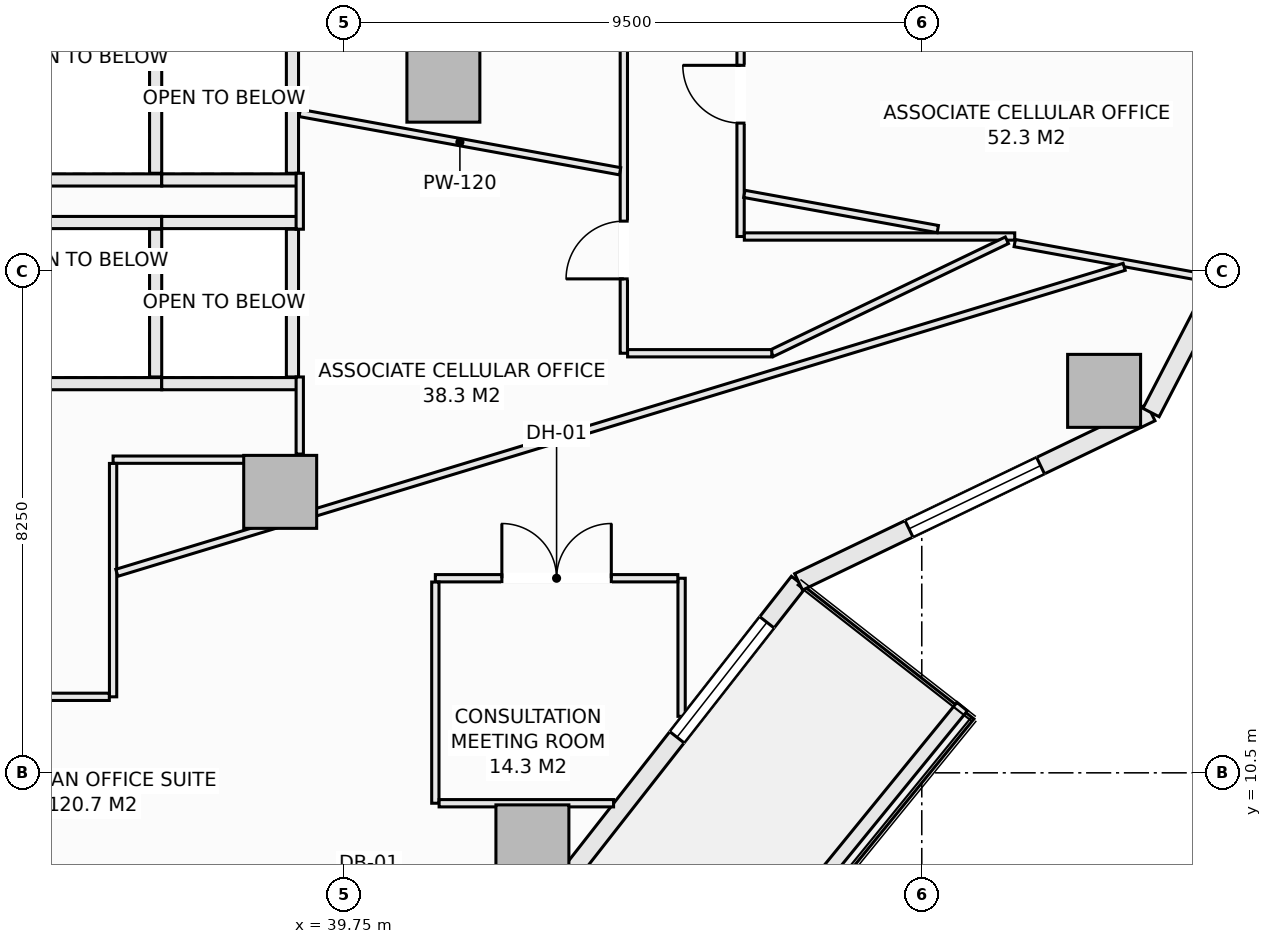
"""IFC4 building model, lengths in metres.
Left out: names, types, materials, properties, quantities, classifications, styles, units other than length and angle.
Written with IfcOpenShell. Run it as: python <this file> out.ifc"""

import sys

from ifc_helpers import new_model, si_unit, direction, frame, frame_2d, origin, origin_2d, place, context, subcontext, project, spatial, rectangle, extrude, element, fill, save


model = new_model("IFC4")
c1 = context("Model", 3, precision=1e-05, world=origin(), true_north=direction((0.0, 1.0)))
c2 = subcontext(c1, "Body", "Model", "MODEL_VIEW")
j1 = project(units=[si_unit("LENGTHUNIT", "METRE"), si_unit("PLANEANGLEUNIT", "RADIAN")], contexts=[c1])
p1 = place(None, origin())
s1 = spatial("IfcSite", under=j1, at=p1, CompositionType="ELEMENT")
p2 = place(p1, origin())
s2 = spatial("IfcBuilding", under=s1, at=p2, CompositionType="ELEMENT")
p3 = place(p2, frame((0.0, 0.0, 72.7)))
s3 = spatial("IfcBuildingStorey", under=s2, at=p3, CompositionType="ELEMENT", Elevation=72.7)
for number, where, z_axis, x_axis in (
    (1, (42.846, 9.373, -0.28), (0.0, 0.0, 1.0), (1.0, 0.0, 0.0)),
    (2, (52.249, 16.781, -0.28), (0.0, 0.0, 1.0), (1.0, 0.0, 0.0)),
    (3, (38.698, 15.121, -0.28), (0.0, 0.0, 1.0), (1.0, 0.0, 0.0)),
    (4, (41.382, 21.801, -0.28), (0.0, 0.0, 1.0), (1.0, 0.0, 0.0)),
):
    element("IfcColumn", number, at=place(p3, frame(where, z_axis=z_axis, x_axis=x_axis)), inside=s3, PredefinedType="COLUMN", context=c2, shape_type="SweptSolid", body=[
        extrude(rectangle(XDim=1.2, YDim=1.2, at=origin_2d()), origin(), (0.0, 0.0, 1.0), 3.85),
    ])
p4 = place(p3, frame((43.344, 8.684, 0.0), z_axis=(0.0, 0.0, 1.0), x_axis=(0.616434798832, 0.78740595552, 0.0)))
e5 = element("IfcWall", 5, at=p4, inside=s3, PredefinedType="SOLIDWALL", context=c2, shape_type="SweptSolid", body=[
    extrude(rectangle(XDim=6.294, YDim=0.3, at=frame_2d((3.147, 0.0))), origin(), (0.0, 0.0, 1.0), 3.093),
])
p5 = place(p4, frame((3.05, 0.0, 0.85)))
e6 = element("IfcOpeningElement", 6, at=p5, cuts=e5, PredefinedType="OPENING", context=c2, shape_type="SweptSolid", body=[
    extrude(rectangle(XDim=2.4, YDim=1.9, at=frame_2d((1.2, 0.95))), frame((0.0, 0.16, 0.0), z_axis=(0.0, -1.0, 0.0), x_axis=(1.0, 0.0, 0.0)), (0.0, 0.0, 1.0), 0.32),
])
p6 = place(p3, frame((47.224, 13.64, 0.0), z_axis=(0.0, 0.0, 1.0), x_axis=(0.901354747727, 0.433081538224, 0.0)))
e7 = element("IfcWall", 7, at=p6, inside=s3, PredefinedType="SOLIDWALL", context=c2, shape_type="SweptSolid", body=[
    extrude(rectangle(XDim=6.431, YDim=0.3, at=frame_2d((3.215, 0.0))), origin(), (0.0, 0.0, 1.0), 3.093),
])
p7 = place(p6, frame((2.015, 0.0, 0.85)))
e8 = element("IfcOpeningElement", 8, at=p7, cuts=e7, PredefinedType="OPENING", context=c2, shape_type="SweptSolid", body=[
    extrude(rectangle(XDim=2.4, YDim=1.9, at=frame_2d((1.2, 0.95))), frame((0.0, 0.16, 0.0), z_axis=(0.0, -1.0, 0.0), x_axis=(1.0, 0.0, 0.0)), (0.0, 0.0, 1.0), 0.32),
])
p8 = place(p3, frame((53.021, 16.425, 0.0), z_axis=(0.0, 0.0, 1.0), x_axis=(0.459800981414, 0.888021991558, 0.0)))
e9 = element("IfcWall", 9, at=p8, inside=s3, PredefinedType="SOLIDWALL", context=c2, shape_type="SweptSolid", body=[
    extrude(rectangle(XDim=5.744, YDim=0.3, at=frame_2d((2.872, 0.0))), origin(), (0.0, 0.0, 1.0), 3.093),
])
p9 = place(p8, frame((2.85, 0.0, 0.85)))
e10 = element("IfcOpeningElement", 10, at=p9, cuts=e9, PredefinedType="OPENING", context=c2, shape_type="SweptSolid", body=[
    extrude(rectangle(XDim=2.4, YDim=1.9, at=frame_2d((1.2, 0.95))), frame((0.0, 0.16, 0.0), z_axis=(0.0, -1.0, 0.0), x_axis=(1.0, 0.0, 0.0)), (0.0, 0.0, 1.0), 0.32),
])
p10 = place(p3, frame((45.292, 5.918, 0.0), z_axis=(0.0, 0.0, 1.0), x_axis=(0.631819273026, 0.775115737315, 0.0)))
e11 = element("IfcWall", 11, at=p10, inside=s3, PredefinedType="PARAPET", context=c2, shape_type="SweptSolid", body=[
    extrude(rectangle(XDim=7.316, YDim=0.22, at=frame_2d((3.658, 0.0))), origin(), (0.0, 0.0, 1.0), 0.52),
])
for number, where, z_axis, x_axis in (
    (12, (34.5, 19.55, 0.0), (0.0, 0.0, 1.0), (1.0, 0.0, 0.0)),
    (13, (34.5, 16.9, 0.0), (0.0, 0.0, 1.0), (1.0, 0.0, 0.0)),
):
    element("IfcWall", number, at=place(p3, frame(where, z_axis=z_axis, x_axis=x_axis)), inside=s3, PredefinedType="SOLIDWALL", context=c2, shape_type="SweptSolid", body=[
        extrude(rectangle(XDim=2.25, YDim=0.2, at=frame_2d((1.125, 0.0))), origin(), (0.0, 0.0, 1.0), 3.57),
    ])
p11 = place(p3, frame((36.65, 17.01, 0.0), z_axis=(0.0, 0.0, 1.0), x_axis=(0.0, 1.0, 0.0)))
e14 = element("IfcWall", 14, at=p11, inside=s3, PredefinedType="SOLIDWALL", context=c2, shape_type="SweptSolid", body=[
    extrude(rectangle(XDim=2.43, YDim=0.2, at=frame_2d((1.215, 0.0))), origin(), (0.0, 0.0, 1.0), 3.57),
])
for number, where, z_axis, x_axis in (
    (15, (36.75, 19.55, 0.0), (0.0, 0.0, 1.0), (1.0, 0.0, 0.0)),
    (16, (36.75, 16.9, 0.0), (0.0, 0.0, 1.0), (1.0, 0.0, 0.0)),
):
    element("IfcWall", number, at=place(p3, frame(where, z_axis=z_axis, x_axis=x_axis)), inside=s3, PredefinedType="SOLIDWALL", context=c2, shape_type="SweptSolid", body=[
        extrude(rectangle(XDim=2.25, YDim=0.2, at=frame_2d((1.125, 0.0))), origin(), (0.0, 0.0, 1.0), 3.57),
    ])
p12 = place(p3, frame((38.9, 17.01, 0.0), z_axis=(0.0, 0.0, 1.0), x_axis=(0.0, 1.0, 0.0)))
e17 = element("IfcWall", 17, at=p12, inside=s3, PredefinedType="SOLIDWALL", context=c2, shape_type="SweptSolid", body=[
    extrude(rectangle(XDim=2.43, YDim=0.2, at=frame_2d((1.215, 0.0))), origin(), (0.0, 0.0, 1.0), 3.57),
])
p13 = place(p3, frame((34.5, 20.25, 0.0), z_axis=(0.0, 0.0, 1.0), x_axis=(1.0, 0.0, 0.0)))
e18 = element("IfcWall", 18, at=p13, inside=s3, PredefinedType="SOLIDWALL", context=c2, shape_type="SweptSolid", body=[
    extrude(rectangle(XDim=2.25, YDim=0.2, at=frame_2d((1.125, 0.0))), origin(), (0.0, 0.0, 1.0), 3.57),
])
p14 = place(p3, frame((36.65, 20.36, 0.0), z_axis=(0.0, 0.0, 1.0), x_axis=(0.0, 1.0, 0.0)))
e19 = element("IfcWall", 19, at=p14, inside=s3, PredefinedType="SOLIDWALL", context=c2, shape_type="SweptSolid", body=[
    extrude(rectangle(XDim=2.43, YDim=0.2, at=frame_2d((1.215, 0.0))), origin(), (0.0, 0.0, 1.0), 3.57),
])
p15 = place(p3, frame((36.75, 20.25, 0.0), z_axis=(0.0, 0.0, 1.0), x_axis=(1.0, 0.0, 0.0)))
e20 = element("IfcWall", 20, at=p15, inside=s3, PredefinedType="SOLIDWALL", context=c2, shape_type="SweptSolid", body=[
    extrude(rectangle(XDim=2.25, YDim=0.2, at=frame_2d((1.125, 0.0))), origin(), (0.0, 0.0, 1.0), 3.57),
])
p16 = place(p3, frame((38.9, 20.36, 0.0), z_axis=(0.0, 0.0, 1.0), x_axis=(0.0, 1.0, 0.0)))
e21 = element("IfcWall", 21, at=p16, inside=s3, PredefinedType="SOLIDWALL", context=c2, shape_type="SweptSolid", body=[
    extrude(rectangle(XDim=2.43, YDim=0.2, at=frame_2d((1.215, 0.0))), origin(), (0.0, 0.0, 1.0), 3.57),
])
p17 = place(p3, frame((35.95, 15.65, 0.0), z_axis=(0.0, 0.0, 1.0), x_axis=(1.0, 0.0, 0.0)))
e22 = element("IfcWall", 22, at=p17, inside=s3, PredefinedType="PARTITIONING", context=c2, shape_type="SweptSolid", body=[
    extrude(rectangle(XDim=2.291, YDim=0.12, at=frame_2d((1.146, 0.0))), origin(), (0.0, 0.0, 1.0), 3.57),
])
p18 = place(p3, frame((35.95, 11.75, 0.0), z_axis=(0.0, 0.0, 1.0), x_axis=(0.0, 1.0, 0.0)))
e23 = element("IfcWall", 23, at=p18, inside=s3, PredefinedType="PARTITIONING", context=c2, shape_type="SweptSolid", body=[
    extrude(rectangle(XDim=3.838, YDim=0.12, at=frame_2d((1.919, 0.0))), origin(), (0.0, 0.0, 1.0), 3.57),
])
p19 = place(p3, frame((27.242, 11.75, 0.0), z_axis=(0.0, 0.0, 1.0), x_axis=(1.0, 0.0, 0.0)))
e24 = element("IfcWall", 24, at=p19, inside=s3, PredefinedType="PARTITIONING", context=c2, shape_type="SweptSolid", body=[
    extrude(rectangle(XDim=8.646, YDim=0.12, at=frame_2d((4.323, 0.0))), origin(), (0.0, 0.0, 1.0), 3.57),
])
p20 = place(p19, frame((2.514, 0.0, 0.0)))
e25 = element("IfcOpeningElement", 25, at=p20, cuts=e24, PredefinedType="OPENING", context=c2, shape_type="SweptSolid", body=[
    extrude(rectangle(XDim=0.95, YDim=2.1, at=frame_2d((0.475, 1.05))), frame((0.0, 0.07, 0.0), z_axis=(0.0, -1.0, 0.0), x_axis=(1.0, 0.0, 0.0)), (0.0, 0.0, 1.0), 0.14),
])
p21 = place(p19, frame((6.011, 0.0, 0.0)))
e26 = element("IfcOpeningElement", 26, at=p21, cuts=e24, PredefinedType="OPENING", context=c2, shape_type="SweptSolid", body=[
    extrude(rectangle(XDim=0.95, YDim=2.1, at=frame_2d((0.475, 1.05))), frame((0.0, 0.07, 0.0), z_axis=(0.0, -1.0, 0.0), x_axis=(1.0, 0.0, 0.0)), (0.0, 0.0, 1.0), 0.14),
])
p22 = place(p3, frame((44.35, 17.4, 0.0), z_axis=(0.0, 0.0, 1.0), x_axis=(0.0, 1.0, 0.0)))
e27 = element("IfcWall", 27, at=p22, inside=s3, PredefinedType="PARTITIONING", context=c2, shape_type="SweptSolid", body=[
    extrude(rectangle(XDim=5.62, YDim=0.12, at=frame_2d((2.81, 0.0))), origin(), (0.0, 0.0, 1.0), 3.57),
])
p23 = place(p22, frame((1.223, 0.0, 0.0)))
e28 = element("IfcOpeningElement", 28, at=p23, cuts=e27, PredefinedType="OPENING", context=c2, shape_type="SweptSolid", body=[
    extrude(rectangle(XDim=0.95, YDim=2.1, at=frame_2d((0.475, 1.05))), frame((0.0, 0.07, 0.0), z_axis=(0.0, -1.0, 0.0), x_axis=(1.0, 0.0, 0.0)), (0.0, 0.0, 1.0), 0.14),
])
p24 = place(p3, frame((46.27, 19.32, 0.0), z_axis=(0.0, 0.0, 1.0), x_axis=(0.0, 1.0, 0.0)))
e29 = element("IfcWall", 29, at=p24, inside=s3, PredefinedType="PARTITIONING", context=c2, shape_type="SweptSolid", body=[
    extrude(rectangle(XDim=14.798, YDim=0.12, at=frame_2d((7.399, 0.0))), origin(), (0.0, 0.0, 1.0), 3.57),
])
p25 = place(p24, frame((1.865, 0.0, 0.0)))
e30 = element("IfcOpeningElement", 30, at=p25, cuts=e29, PredefinedType="OPENING", context=c2, shape_type="SweptSolid", body=[
    extrude(rectangle(XDim=0.95, YDim=2.1, at=frame_2d((0.475, 1.05))), frame((0.0, 0.07, 0.0), z_axis=(0.0, -1.0, 0.0), x_axis=(1.0, 0.0, 0.0)), (0.0, 0.0, 1.0), 0.14),
])
p26 = place(p24, frame((5.818, 0.0, 0.0)))
e31 = element("IfcOpeningElement", 31, at=p26, cuts=e29, PredefinedType="OPENING", context=c2, shape_type="SweptSolid", body=[
    extrude(rectangle(XDim=0.95, YDim=2.1, at=frame_2d((0.475, 1.05))), frame((0.0, 0.07, 0.0), z_axis=(0.0, -1.0, 0.0), x_axis=(1.0, 0.0, 0.0)), (0.0, 0.0, 1.0), 0.14),
])
p27 = place(p24, frame((10.871, 0.0, 0.0)))
e32 = element("IfcOpeningElement", 32, at=p27, cuts=e29, PredefinedType="OPENING", context=c2, shape_type="SweptSolid", body=[
    extrude(rectangle(XDim=0.95, YDim=2.1, at=frame_2d((0.475, 1.05))), frame((0.0, 0.07, 0.0), z_axis=(0.0, -1.0, 0.0), x_axis=(1.0, 0.0, 0.0)), (0.0, 0.0, 1.0), 0.14),
])
p28 = place(p3, frame((46.332, 19.32, 0.0), z_axis=(0.0, 0.0, 1.0), x_axis=(1.0, 0.0, 0.0)))
e33 = element("IfcWall", 33, at=p28, inside=s3, PredefinedType="PARTITIONING", context=c2, shape_type="SweptSolid", body=[
    extrude(rectangle(XDim=4.447, YDim=0.12, at=frame_2d((2.224, 0.0))), origin(), (0.0, 0.0, 1.0), 3.205),
])
p29 = place(p3, frame((46.783, 17.4, 0.0), z_axis=(0.0, 0.0, 1.0), x_axis=(0.901339159108, 0.433113980679, 0.0)))
e34 = element("IfcWall", 34, at=p29, inside=s3, PredefinedType="PARTITIONING", context=c2, shape_type="SweptSolid", body=[
    extrude(rectangle(XDim=4.29, YDim=0.12, at=frame_2d((2.145, 0.0))), origin(), (0.0, 0.0, 1.0), 3.57),
])
p30 = place(p3, frame((44.412, 17.4, 0.0), z_axis=(0.0, 0.0, 1.0), x_axis=(1.0, 0.0, 0.0)))
e35 = element("IfcWall", 35, at=p30, inside=s3, PredefinedType="PARTITIONING", context=c2, shape_type="SweptSolid", body=[
    extrude(rectangle(XDim=2.371, YDim=0.12, at=frame_2d((1.186, 0.0))), origin(), (0.0, 0.0, 1.0), 3.57),
])
p31 = place(p3, frame((39.02, 15.742, 0.0), z_axis=(0.0, 0.0, 1.0), x_axis=(0.0, 1.0, 0.0)))
e36 = element("IfcWall", 36, at=p31, inside=s3, PredefinedType="PARTITIONING", context=c2, shape_type="SweptSolid", body=[
    extrude(rectangle(XDim=1.268, YDim=0.12, at=frame_2d((0.634, 0.0))), origin(), (0.0, 0.0, 1.0), 2.934),
])
p32 = place(p3, frame((39.02, 19.44, 0.0), z_axis=(0.0, 0.0, 1.0), x_axis=(0.0, 1.0, 0.0)))
e37 = element("IfcWall", 37, at=p32, inside=s3, PredefinedType="PARTITIONING", context=c2, shape_type="SweptSolid", body=[
    extrude(rectangle(XDim=0.92, YDim=0.12, at=frame_2d((0.46, 0.0))), origin(), (0.0, 0.0, 1.0), 3.57),
])
p33 = place(p3, frame((39.02, 21.351, 0.0), z_axis=(0.0, 0.0, 1.0), x_axis=(0.983848017156, -0.179005807552, 0.0)))
e38 = element("IfcWall", 38, at=p33, inside=s3, PredefinedType="PARTITIONING", context=c2, shape_type="SweptSolid", body=[
    extrude(rectangle(XDim=5.354, YDim=0.12, at=frame_2d((2.677, 0.0))), origin(), (0.0, 0.0, 1.0), 3.205),
])
p34 = place(p3, frame((46.332, 20.021, 0.0), z_axis=(0.0, 0.0, 1.0), x_axis=(0.983836071263, -0.17907145189, 0.0)))
e39 = element("IfcWall", 39, at=p34, inside=s3, PredefinedType="PARTITIONING", context=c2, shape_type="SweptSolid", body=[
    extrude(rectangle(XDim=3.234, YDim=0.12, at=frame_2d((1.617, 0.0))), origin(), (0.0, 0.0, 1.0), 3.57),
])
p35 = place(p3, frame((50.779, 19.212, 0.0), z_axis=(0.0, 0.0, 1.0), x_axis=(0.983831584621, -0.179096100189, 0.0)))
e40 = element("IfcWall", 40, at=p35, inside=s3, PredefinedType="PARTITIONING", context=c2, shape_type="SweptSolid", body=[
    extrude(rectangle(XDim=3.263, YDim=0.12, at=frame_2d((1.632, 0.0))), origin(), (0.0, 0.0, 1.0), 3.57),
])
p36 = place(p3, frame((36.012, 13.79, 0.0), z_axis=(0.0, 0.0, 1.0), x_axis=(0.95683920317, 0.290617857809, 0.0)))
e41 = element("IfcWall", 41, at=p36, inside=s3, PredefinedType="PARTITIONING", context=c2, shape_type="SweptSolid", body=[
    extrude(rectangle(XDim=17.314, YDim=0.12, at=frame_2d((8.657, 0.0))), origin(), (0.0, 0.0, 1.0), 3.57),
])
p37 = place(p3, frame((45.3, 11.429, 0.0), z_axis=(0.0, 0.0, 1.0), x_axis=(0.0, 1.0, 0.0)))
e42 = element("IfcWall", 42, at=p37, inside=s3, PredefinedType="PARTITIONING", context=c2, shape_type="SweptSolid", body=[
    extrude(rectangle(XDim=2.271, YDim=0.12, at=frame_2d((1.135, 0.0))), origin(), (0.0, 0.0, 1.0), 3.57),
])
p38 = place(p3, frame((41.25, 13.7, 0.0), z_axis=(0.0, 0.0, 1.0), x_axis=(1.0, 0.0, 0.0)))
e43 = element("IfcWall", 43, at=p38, inside=s3, PredefinedType="PARTITIONING", context=c2, shape_type="SweptSolid", body=[
    extrude(rectangle(XDim=3.988, YDim=0.12, at=frame_2d((1.994, 0.0))), origin(), (0.0, 0.0, 1.0), 3.57),
])
p39 = place(p38, frame((1.094, 0.0, 0.0)))
e44 = element("IfcOpeningElement", 44, at=p39, cuts=e43, PredefinedType="OPENING", context=c2, shape_type="SweptSolid", body=[
    extrude(rectangle(XDim=1.8, YDim=2.3, at=frame_2d((0.9, 1.15))), frame((0.0, 0.07, 0.0), z_axis=(0.0, -1.0, 0.0), x_axis=(1.0, 0.0, 0.0)), (0.0, 0.0, 1.0), 0.14),
])
p40 = place(p3, frame((41.25, 10.0, 0.0), z_axis=(0.0, 0.0, 1.0), x_axis=(0.0, 1.0, 0.0)))
e45 = element("IfcWall", 45, at=p40, inside=s3, PredefinedType="PARTITIONING", context=c2, shape_type="SweptSolid", body=[
    extrude(rectangle(XDim=3.638, YDim=0.12, at=frame_2d((1.819, 0.0))), origin(), (0.0, 0.0, 1.0), 2.934),
])
p41 = place(p3, frame((41.312, 10.0, 0.0), z_axis=(0.0, 0.0, 1.0), x_axis=(1.0, 0.0, 0.0)))
e46 = element("IfcWall", 46, at=p41, inside=s3, PredefinedType="PARTITIONING", context=c2, shape_type="SweptSolid", body=[
    extrude(rectangle(XDim=2.869, YDim=0.12, at=frame_2d((1.435, 0.0))), origin(), (0.0, 0.0, 1.0), 3.093),
])
p42 = place(p5, origin())
e47 = element("IfcWindow", 47, at=p42, inside=s3, PartitioningType="SINGLE_PANEL", PredefinedType="WINDOW", context=c2, shape_type="SweptSolid", body=[
    extrude(rectangle(XDim=2.4, YDim=1.9, at=frame_2d((1.2, 0.95))), frame((0.0, 0.03, 0.0), z_axis=(0.0, -1.0, 0.0), x_axis=(1.0, 0.0, 0.0)), (0.0, 0.0, 1.0), 0.06),
])
fill(e6, e47)
p43 = place(p7, origin())
e48 = element("IfcWindow", 48, at=p43, inside=s3, PartitioningType="SINGLE_PANEL", PredefinedType="WINDOW", context=c2, shape_type="SweptSolid", body=[
    extrude(rectangle(XDim=2.4, YDim=1.9, at=frame_2d((1.2, 0.95))), frame((0.0, 0.03, 0.0), z_axis=(0.0, -1.0, 0.0), x_axis=(1.0, 0.0, 0.0)), (0.0, 0.0, 1.0), 0.06),
])
fill(e8, e48)
p44 = place(p23, origin())
e49 = element("IfcDoor", 49, at=p44, inside=s3, OperationType="SINGLE_SWING_LEFT", PredefinedType="DOOR", context=c2, shape_type="SweptSolid", body=[
    extrude(rectangle(XDim=0.95, YDim=2.1, at=frame_2d((0.475, 1.05))), frame((0.0, 0.025, 0.0), z_axis=(0.0, -1.0, 0.0), x_axis=(1.0, 0.0, 0.0)), (0.0, 0.0, 1.0), 0.05),
])
fill(e28, e49)
p45 = place(p25, origin())
e50 = element("IfcDoor", 50, at=p45, inside=s3, OperationType="SINGLE_SWING_RIGHT", PredefinedType="DOOR", context=c2, shape_type="SweptSolid", body=[
    extrude(rectangle(XDim=0.95, YDim=2.1, at=frame_2d((0.475, 1.05))), frame((0.0, 0.025, 0.0), z_axis=(0.0, -1.0, 0.0), x_axis=(1.0, 0.0, 0.0)), (0.0, 0.0, 1.0), 0.05),
])
fill(e30, e50)
p46 = place(p39, origin())
e51 = element("IfcDoor", 51, at=p46, inside=s3, OperationType="DOUBLE_DOOR_SINGLE_SWING", PredefinedType="DOOR", context=c2, shape_type="SweptSolid", body=[
    extrude(rectangle(XDim=1.8, YDim=2.3, at=frame_2d((0.9, 1.15))), frame((0.0, 0.025, 0.0), z_axis=(0.0, -1.0, 0.0), x_axis=(1.0, 0.0, 0.0)), (0.0, 0.0, 1.0), 0.05),
])
fill(e44, e51)
save(model, sys.argv[1])
